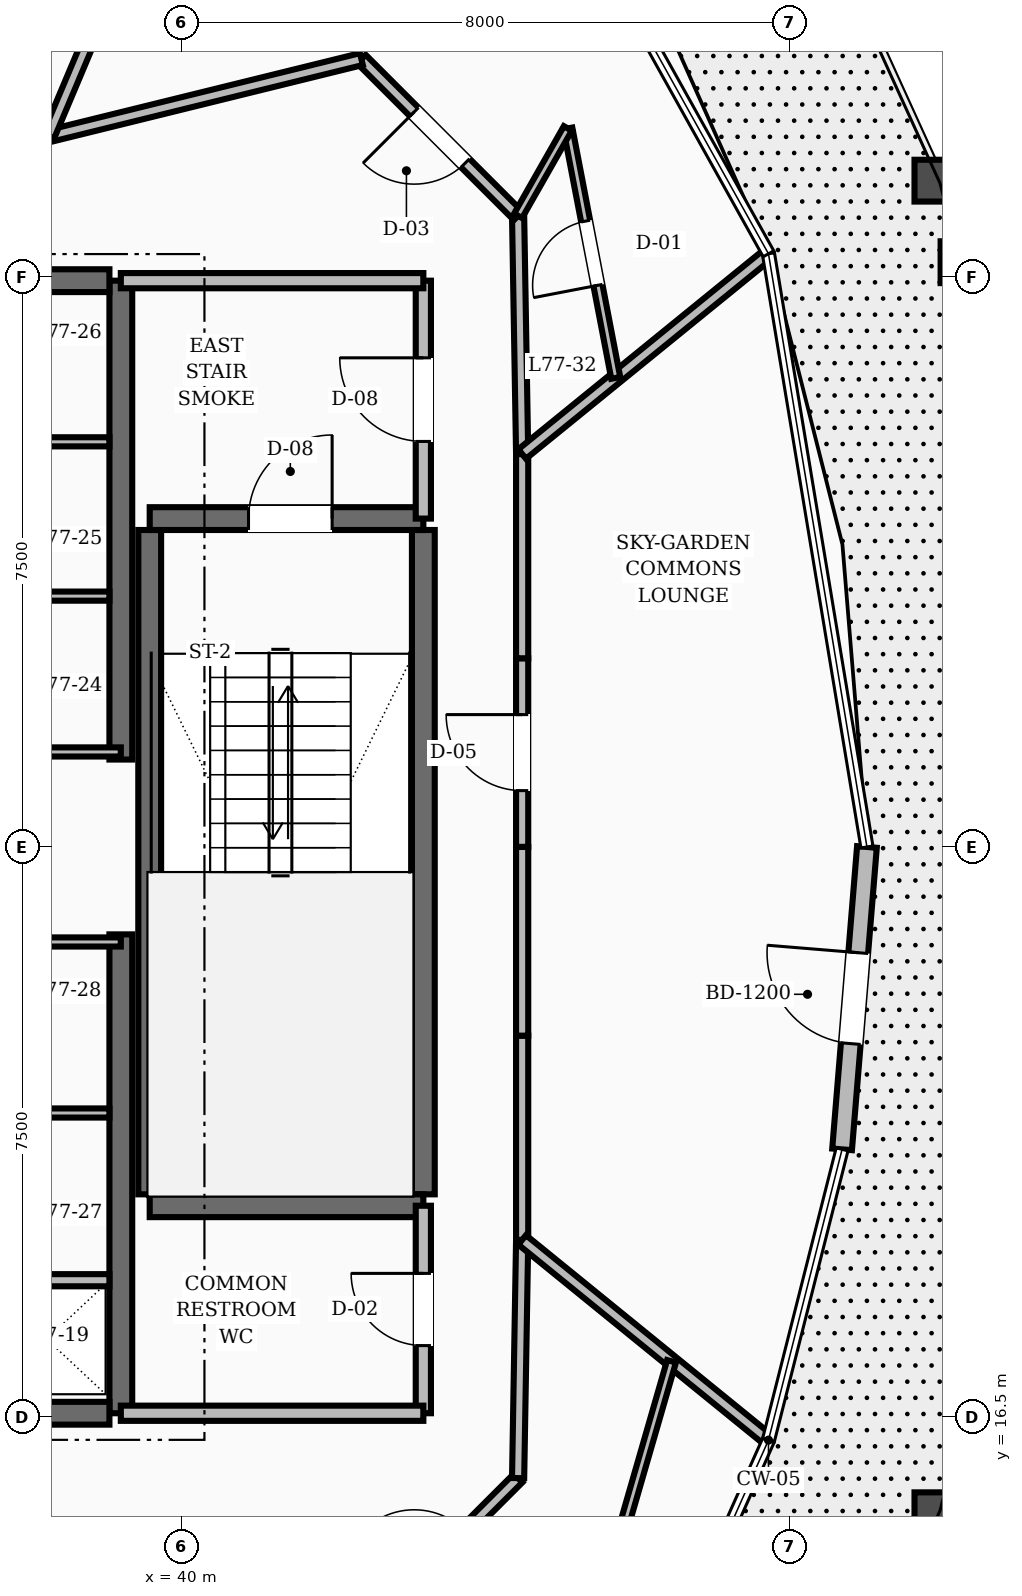
"""IFC4 building model, lengths in metres.
Left out: names, types, materials, properties, quantities, classifications, styles, units other than length and angle.
Written with IfcOpenShell. Run it as: python <this file> out.ifc"""

import sys

from ifc_helpers import new_model, si_unit, direction, frame, frame_2d, origin, place, context, subcontext, project, spatial, rectangle, extrude, element, fill, save


model = new_model("IFC4")
c1 = context("Model", 3, precision=1e-05, world=origin(), true_north=direction((0.0, 1.0)))
c2 = subcontext(c1, "Body", "Model", "MODEL_VIEW")
j1 = project(units=[si_unit("LENGTHUNIT", "METRE"), si_unit("PLANEANGLEUNIT", "RADIAN")], contexts=[c1])
p1 = place(None, origin())
s1 = spatial("IfcSite", under=j1, at=p1, CompositionType="ELEMENT")
p2 = place(p1, origin())
s2 = spatial("IfcBuilding", under=s1, at=p2, CompositionType="ELEMENT")
p3 = place(p2, frame((0.0, 0.0, 294.0)))
s3 = spatial("IfcBuildingStorey", under=s2, at=p3, CompositionType="ELEMENT", Elevation=294.0)
for number, where, z_axis, x_axis in (
    (1, (39.2, 16.55, 0.0), (0.0, 0.0, 1.0), (0.0, 1.0, 0.0)),
    (2, (39.2, 25.15, 0.0), (0.0, 0.0, 1.0), (0.0, 1.0, 0.0)),
):
    element("IfcWall", number, at=place(p3, frame(where, z_axis=z_axis, x_axis=x_axis)), inside=s3, PredefinedType="SHEAR", context=c2, shape_type="SweptSolid", body=[
        extrude(rectangle(XDim=6.3, YDim=0.3, at=frame_2d((3.15, 0.0))), origin(), (0.0, 0.0, 1.0), 3.6),
    ])
p4 = place(p3, frame((35.8, 16.55, 0.0), z_axis=(0.0, 0.0, 1.0), x_axis=(1.0, 0.0, 0.0)))
e3 = element("IfcWall", 3, at=p4, inside=s3, PredefinedType="SHEAR", context=c2, shape_type="SweptSolid", body=[
    extrude(rectangle(XDim=3.25, YDim=0.3, at=frame_2d((1.625, 0.0))), origin(), (0.0, 0.0, 1.0), 3.6),
])
p5 = place(p4, frame((0.3, 0.0, 0.0)))
e4 = element("IfcOpeningElement", 4, at=p5, cuts=e3, PredefinedType="OPENING", context=c2, shape_type="SweptSolid", body=[
    extrude(rectangle(XDim=1.1, YDim=2.1, at=frame_2d((0.55, 1.05))), frame((0.0, 0.16, 0.0), z_axis=(0.0, -1.0, 0.0), x_axis=(1.0, 0.0, 0.0)), (0.0, 0.0, 1.0), 0.32),
])
p6 = place(p3, frame((35.8, 31.45, 0.0), z_axis=(0.0, 0.0, 1.0), x_axis=(1.0, 0.0, 0.0)))
e5 = element("IfcWall", 5, at=p6, inside=s3, PredefinedType="SHEAR", context=c2, shape_type="SweptSolid", body=[
    extrude(rectangle(XDim=3.25, YDim=0.3, at=frame_2d((1.625, 0.0))), origin(), (0.0, 0.0, 1.0), 3.6),
])
p7 = place(p6, frame((0.3, 0.0, 0.0)))
e6 = element("IfcOpeningElement", 6, at=p7, cuts=e5, PredefinedType="OPENING", context=c2, shape_type="SweptSolid", body=[
    extrude(rectangle(XDim=1.1, YDim=2.1, at=frame_2d((0.55, 1.05))), frame((0.0, 0.16, 0.0), z_axis=(0.0, -1.0, 0.0), x_axis=(1.0, 0.0, 0.0)), (0.0, 0.0, 1.0), 0.32),
])
for number, where, z_axis, x_axis in (
    (7, (43.18, 19.43, 0.0), (0.0, 0.0, 1.0), (0.0, 1.0, 0.0)),
    (8, (39.58, 19.43, 0.0), (0.0, 0.0, 1.0), (0.0, 1.0, 0.0)),
):
    element("IfcWall", number, at=place(p3, frame(where, z_axis=z_axis, x_axis=x_axis)), inside=s3, PredefinedType="SHEAR", context=c2, shape_type="SweptSolid", body=[
        extrude(rectangle(XDim=8.74, YDim=0.3, at=frame_2d((4.37, 0.0))), origin(), (0.0, 0.0, 1.0), 3.6),
    ])
p8 = place(p3, frame((39.58, 19.28, 0.0), z_axis=(0.0, 0.0, 1.0), x_axis=(1.0, 0.0, 0.0)))
e9 = element("IfcWall", 9, at=p8, inside=s3, PredefinedType="SHEAR", context=c2, shape_type="SweptSolid", body=[
    extrude(rectangle(XDim=3.6, YDim=0.3, at=frame_2d((1.8, 0.0))), origin(), (0.0, 0.0, 1.0), 3.6),
])
p9 = place(p3, frame((39.58, 28.32, 0.0), z_axis=(0.0, 0.0, 1.0), x_axis=(1.0, 0.0, 0.0)))
e10 = element("IfcWall", 10, at=p9, inside=s3, PredefinedType="SHEAR", context=c2, shape_type="SweptSolid", body=[
    extrude(rectangle(XDim=3.6, YDim=0.3, at=frame_2d((1.8, 0.0))), origin(), (0.0, 0.0, 1.0), 3.6),
])
p10 = place(p9, frame((1.3, 0.0, 0.0)))
e11 = element("IfcOpeningElement", 11, at=p10, cuts=e10, PredefinedType="OPENING", context=c2, shape_type="SweptSolid", body=[
    extrude(rectangle(XDim=1.1, YDim=2.1, at=frame_2d((0.55, 1.05))), frame((0.0, 0.16, 0.0), z_axis=(0.0, -1.0, 0.0), x_axis=(1.0, 0.0, 0.0)), (0.0, 0.0, 1.0), 0.32),
])
p11 = place(p3, frame((48.689, 20.022, 0.0), z_axis=(0.0, 0.0, 1.0), x_axis=(0.081957167383, 0.996635852613, 0.0)))
e12 = element("IfcWall", 12, at=p11, inside=s3, PredefinedType="STANDARD", context=c2, shape_type="SweptSolid", body=[
    extrude(rectangle(XDim=3.992, YDim=0.26, at=frame_2d((1.996, 0.0))), origin(), (0.0, 0.0, 1.0), 2.82),
])
p12 = place(p11, frame((1.396, 0.0, 0.0)))
e13 = element("IfcOpeningElement", 13, at=p12, cuts=e12, PredefinedType="OPENING", context=c2, shape_type="SweptSolid", body=[
    extrude(rectangle(XDim=1.2, YDim=2.15, at=frame_2d((0.6, 1.075))), frame((0.0, 0.14, 0.0), z_axis=(0.0, -1.0, 0.0), x_axis=(1.0, 0.0, 0.0)), (0.0, 0.0, 1.0), 0.28),
])
p13 = place(p3, frame((43.18, 28.32, 0.0), z_axis=(0.0, 0.0, 1.0), x_axis=(0.0, 1.0, 0.0)))
e14 = element("IfcWall", 14, at=p13, inside=s3, PredefinedType="SOLIDWALL", context=c2, shape_type="SweptSolid", body=[
    extrude(rectangle(XDim=3.13, YDim=0.2, at=frame_2d((1.565, 0.0))), origin(), (0.0, 0.0, 1.0), 2.81),
])
p14 = place(p13, frame((1.015, 0.0, 0.0)))
e15 = element("IfcOpeningElement", 15, at=p14, cuts=e14, PredefinedType="OPENING", context=c2, shape_type="SweptSolid", body=[
    extrude(rectangle(XDim=1.1, YDim=2.1, at=frame_2d((0.55, 1.05))), frame((0.0, 0.11, 0.0), z_axis=(0.0, -1.0, 0.0), x_axis=(1.0, 0.0, 0.0)), (0.0, 0.0, 1.0), 0.22),
])
p15 = place(p3, frame((39.2, 31.45, 0.0), z_axis=(0.0, 0.0, 1.0), x_axis=(1.0, 0.0, 0.0)))
e16 = element("IfcWall", 16, at=p15, inside=s3, PredefinedType="SOLIDWALL", context=c2, shape_type="SweptSolid", body=[
    extrude(rectangle(XDim=3.98, YDim=0.2, at=frame_2d((1.99, 0.0))), origin(), (0.0, 0.0, 1.0), 2.81),
])
p16 = place(p3, frame((43.18, 16.55, 0.0), z_axis=(0.0, 0.0, 1.0), x_axis=(0.0, 1.0, 0.0)))
e17 = element("IfcWall", 17, at=p16, inside=s3, PredefinedType="SOLIDWALL", context=c2, shape_type="SweptSolid", body=[
    extrude(rectangle(XDim=2.73, YDim=0.2, at=frame_2d((1.365, 0.0))), origin(), (0.0, 0.0, 1.0), 2.81),
])
p17 = place(p16, frame((0.89, 0.0, 0.0)))
e18 = element("IfcOpeningElement", 18, at=p17, cuts=e17, PredefinedType="OPENING", context=c2, shape_type="SweptSolid", body=[
    extrude(rectangle(XDim=0.95, YDim=2.1, at=frame_2d((0.475, 1.05))), frame((0.0, 0.11, 0.0), z_axis=(0.0, -1.0, 0.0), x_axis=(1.0, 0.0, 0.0)), (0.0, 0.0, 1.0), 0.22),
])
p18 = place(p3, frame((39.2, 16.55, 0.0), z_axis=(0.0, 0.0, 1.0), x_axis=(1.0, 0.0, 0.0)))
e19 = element("IfcWall", 19, at=p18, inside=s3, PredefinedType="SOLIDWALL", context=c2, shape_type="SweptSolid", body=[
    extrude(rectangle(XDim=3.98, YDim=0.2, at=frame_2d((1.99, 0.0))), origin(), (0.0, 0.0, 1.0), 2.81),
])
p19 = place(p3, frame((37.4, 18.3, 0.0), z_axis=(0.0, 0.0, 1.0), x_axis=(1.0, 0.0, 0.0)))
e20 = element("IfcWall", 20, at=p19, inside=s3, PredefinedType="SOLIDWALL", context=c2, shape_type="SweptSolid", body=[
    extrude(rectangle(XDim=1.65, YDim=0.16, at=frame_2d((0.825, 0.0))), origin(), (0.0, 0.0, 1.0), 2.81),
])
for number, where, z_axis, x_axis in (
    (21, (37.4, 25.25, 0.0), (0.0, 0.0, 1.0), (1.0, 0.0, 0.0)),
    (22, (37.4, 22.75, 0.0), (0.0, 0.0, 1.0), (1.0, 0.0, 0.0)),
):
    element("IfcWall", number, at=place(p3, frame(where, z_axis=z_axis, x_axis=x_axis)), inside=s3, PredefinedType="PARTITIONING", context=c2, shape_type="SweptSolid", body=[
        extrude(rectangle(XDim=1.8, YDim=0.12, at=frame_2d((0.9, 0.0))), origin(), (0.0, 0.0, 1.0), 2.81),
    ])
for number, where, z_axis, x_axis in (
    (23, (37.4, 27.3, 0.0), (0.0, 0.0, 1.0), (1.0, 0.0, 0.0)),
    (24, (37.4, 29.33, 0.0), (0.0, 0.0, 1.0), (1.0, 0.0, 0.0)),
    (25, (37.4, 20.5, 0.0), (0.0, 0.0, 1.0), (1.0, 0.0, 0.0)),
):
    element("IfcWall", number, at=place(p3, frame(where, z_axis=z_axis, x_axis=x_axis)), inside=s3, PredefinedType="PARTITIONING", context=c2, shape_type="SweptSolid", body=[
        extrude(rectangle(XDim=1.65, YDim=0.12, at=frame_2d((0.825, 0.0))), origin(), (0.0, 0.0, 1.0), 2.81),
    ])
p20 = place(p3, frame((44.48, 24.0, 0.0), z_axis=(0.0, 0.0, 1.0), x_axis=(0.0, 1.0, 0.0)))
e26 = element("IfcWall", 26, at=p20, inside=s3, PredefinedType="SOLIDWALL", context=c2, shape_type="SweptSolid", body=[
    extrude(rectangle(XDim=2.482, YDim=0.16, at=frame_2d((1.241, 0.0))), origin(), (0.0, 0.0, 1.0), 2.81),
])
p21 = place(p20, frame((0.741, 0.0, 0.0)))
e27 = element("IfcOpeningElement", 27, at=p21, cuts=e26, PredefinedType="OPENING", context=c2, shape_type="SweptSolid", body=[
    extrude(rectangle(XDim=1.0, YDim=2.1, at=frame_2d((0.5, 1.05))), frame((0.0, 0.09, 0.0), z_axis=(0.0, -1.0, 0.0), x_axis=(1.0, 0.0, 0.0)), (0.0, 0.0, 1.0), 0.18),
])
p22 = place(p3, frame((44.48, 26.482, 0.0), z_axis=(0.0, 0.0, 1.0), x_axis=(0.0, 1.0, 0.0)))
e28 = element("IfcWall", 28, at=p22, inside=s3, PredefinedType="SOLIDWALL", context=c2, shape_type="SweptSolid", body=[
    extrude(rectangle(XDim=2.687, YDim=0.16, at=frame_2d((1.344, 0.0))), origin(), (0.0, 0.0, 1.0), 2.81),
])
p23 = place(p3, frame((44.48, 29.169, 0.0), z_axis=(0.0, 0.0, 1.0), x_axis=(-0.016981035134, 0.999855811828, 0.0)))
e29 = element("IfcWall", 29, at=p23, inside=s3, PredefinedType="SOLIDWALL", context=c2, shape_type="SweptSolid", body=[
    extrude(rectangle(XDim=3.134, YDim=0.16, at=frame_2d((1.567, 0.0))), origin(), (0.0, 0.0, 1.0), 2.81),
])
p24 = place(p3, frame((44.427, 32.303, 0.0), z_axis=(0.0, 0.0, 1.0), x_axis=(-0.707106781187, 0.707106781187, 0.0)))
e30 = element("IfcWall", 30, at=p24, inside=s3, PredefinedType="SOLIDWALL", context=c2, shape_type="SweptSolid", body=[
    extrude(rectangle(XDim=2.916, YDim=0.16, at=frame_2d((1.458, 0.0))), origin(), (0.0, 0.0, 1.0), 2.81),
])
p25 = place(p24, frame((0.983, 0.0, 0.0)))
e31 = element("IfcOpeningElement", 31, at=p25, cuts=e30, PredefinedType="OPENING", context=c2, shape_type="SweptSolid", body=[
    extrude(rectangle(XDim=0.95, YDim=2.1, at=frame_2d((0.475, 1.05))), frame((0.0, 0.09, 0.0), z_axis=(0.0, -1.0, 0.0), x_axis=(1.0, 0.0, 0.0)), (0.0, 0.0, 1.0), 0.18),
])
p26 = place(p3, frame((42.365, 34.365, 0.0), z_axis=(0.0, 0.0, 1.0), x_axis=(-0.970939799552, -0.239323850978, 0.0)))
e32 = element("IfcWall", 32, at=p26, inside=s3, PredefinedType="SOLIDWALL", context=c2, shape_type="SweptSolid", body=[
    extrude(rectangle(XDim=4.241, YDim=0.16, at=frame_2d((2.12, 0.0))), origin(), (0.0, 0.0, 1.0), 2.81),
])
p27 = place(p3, frame((42.365, 13.635, 0.0), z_axis=(0.0, 0.0, 1.0), x_axis=(0.707106781187, 0.707106781187, 0.0)))
e33 = element("IfcWall", 33, at=p27, inside=s3, PredefinedType="SOLIDWALL", context=c2, shape_type="SweptSolid", body=[
    extrude(rectangle(XDim=2.916, YDim=0.16, at=frame_2d((1.458, 0.0))), origin(), (0.0, 0.0, 1.0), 2.81),
])
p28 = place(p27, frame((0.983, 0.0, 0.0)))
e34 = element("IfcOpeningElement", 34, at=p28, cuts=e33, PredefinedType="OPENING", context=c2, shape_type="SweptSolid", body=[
    extrude(rectangle(XDim=0.95, YDim=2.1, at=frame_2d((0.475, 1.05))), frame((0.0, 0.09, 0.0), z_axis=(0.0, -1.0, 0.0), x_axis=(1.0, 0.0, 0.0)), (0.0, 0.0, 1.0), 0.18),
])
p29 = place(p3, frame((44.427, 15.697, 0.0), z_axis=(0.0, 0.0, 1.0), x_axis=(0.016981035134, 0.999855811828, 0.0)))
e35 = element("IfcWall", 35, at=p29, inside=s3, PredefinedType="SOLIDWALL", context=c2, shape_type="SweptSolid", body=[
    extrude(rectangle(XDim=3.134, YDim=0.16, at=frame_2d((1.567, 0.0))), origin(), (0.0, 0.0, 1.0), 2.81),
])
p30 = place(p3, frame((44.48, 18.831, 0.0), z_axis=(0.0, 0.0, 1.0), x_axis=(0.0, 1.0, 0.0)))
e36 = element("IfcWall", 36, at=p30, inside=s3, PredefinedType="SOLIDWALL", context=c2, shape_type="SweptSolid", body=[
    extrude(rectangle(XDim=2.687, YDim=0.16, at=frame_2d((1.344, 0.0))), origin(), (0.0, 0.0, 1.0), 2.81),
])
p31 = place(p3, frame((44.48, 21.518, 0.0), z_axis=(0.0, 0.0, 1.0), x_axis=(0.0, 1.0, 0.0)))
e37 = element("IfcWall", 37, at=p31, inside=s3, PredefinedType="SOLIDWALL", context=c2, shape_type="SweptSolid", body=[
    extrude(rectangle(XDim=2.482, YDim=0.16, at=frame_2d((1.241, 0.0))), origin(), (0.0, 0.0, 1.0), 2.81),
])
for number, where, z_axis, x_axis in (
    (38, (44.48, 18.831, 0.0), (0.0, 0.0, 1.0), (0.776, -0.631, 0.0)),
    (39, (44.48, 29.169, 0.0), (0.0, 0.0, 1.0), (0.776, 0.631, 0.0)),
):
    element("IfcWall", number, at=place(p3, frame(where, z_axis=z_axis, x_axis=x_axis)), inside=s3, PredefinedType="SOLIDWALL", context=c2, shape_type="SweptSolid", body=[
        extrude(rectangle(XDim=4.126, YDim=0.16, at=frame_2d((2.063, 0.0))), origin(), (0.0, 0.0, 1.0), 2.81),
    ])
p32 = place(p3, frame((45.711, 30.17, 0.0), z_axis=(0.0, 0.0, 1.0), x_axis=(-0.18865234905, 0.982043935472, 0.0)))
e40 = element("IfcWall", 40, at=p32, inside=s3, PredefinedType="PARTITIONING", context=c2, shape_type="SweptSolid", body=[
    extrude(rectangle(XDim=3.343, YDim=0.12, at=frame_2d((1.671, 0.0))), origin(), (0.0, 0.0, 1.0), 2.81),
])
p33 = place(p32, frame((1.241, 0.0, 0.0)))
e41 = element("IfcOpeningElement", 41, at=p33, cuts=e40, PredefinedType="OPENING", context=c2, shape_type="SweptSolid", body=[
    extrude(rectangle(XDim=0.86, YDim=2.1, at=frame_2d((0.43, 1.05))), frame((0.0, 0.07, 0.0), z_axis=(0.0, -1.0, 0.0), x_axis=(1.0, 0.0, 0.0)), (0.0, 0.0, 1.0), 0.14),
])
p34 = place(p3, frame((44.427, 32.303, 0.0), z_axis=(0.0, 0.0, 1.0), x_axis=(0.494408865021, 0.869229471537, 0.0)))
e42 = element("IfcWall", 42, at=p34, inside=s3, PredefinedType="PARTITIONING", context=c2, shape_type="SweptSolid", body=[
    extrude(rectangle(XDim=1.323, YDim=0.12, at=frame_2d((0.662, 0.0))), origin(), (0.0, 0.0, 1.0), 2.81),
])
p35 = place(p3, frame((38.248, 33.35, 0.0), z_axis=(0.0, 0.0, 1.0), x_axis=(0.388445474078, 0.921471710726, 0.0)))
e43 = element("IfcWall", 43, at=p35, inside=s3, PredefinedType="SOLIDWALL", context=c2, shape_type="SweptSolid", body=[
    extrude(rectangle(XDim=8.203, YDim=0.16, at=frame_2d((4.102, 0.0))), origin(), (0.0, 0.0, 1.0), 2.81),
])
p36 = place(p3, frame((45.471, 13.862, 0.0), z_axis=(0.0, 0.0, 1.0), x_axis=(0.277715153413, 0.960663465301, 0.0)))
e44 = element("IfcWall", 44, at=p36, inside=s3, PredefinedType="PARTITIONING", context=c2, shape_type="SweptSolid", body=[
    extrude(rectangle(XDim=3.509, YDim=0.12, at=frame_2d((1.755, 0.0))), origin(), (0.0, 0.0, 1.0), 2.81),
])
p37 = place(p12, origin())
e45 = element("IfcDoor", 45, at=p37, inside=s3, OperationType="SINGLE_SWING_RIGHT", PredefinedType="DOOR", context=c2, shape_type="SweptSolid", body=[
    extrude(rectangle(XDim=1.2, YDim=2.15, at=frame_2d((0.6, 1.075))), frame((0.0, 0.025, 0.0), z_axis=(0.0, -1.0, 0.0), x_axis=(1.0, 0.0, 0.0)), (0.0, 0.0, 1.0), 0.05),
])
fill(e13, e45)
p38 = place(p10, origin())
e46 = element("IfcDoor", 46, at=p38, inside=s3, OperationType="SINGLE_SWING_RIGHT", PredefinedType="DOOR", context=c2, shape_type="SweptSolid", body=[
    extrude(rectangle(XDim=1.1, YDim=2.1, at=frame_2d((0.55, 1.05))), frame((0.0, 0.025, 0.0), z_axis=(0.0, -1.0, 0.0), x_axis=(1.0, 0.0, 0.0)), (0.0, 0.0, 1.0), 0.05),
])
fill(e11, e46)
p39 = place(p14, origin())
e47 = element("IfcDoor", 47, at=p39, inside=s3, OperationType="SINGLE_SWING_RIGHT", PredefinedType="DOOR", context=c2, shape_type="SweptSolid", body=[
    extrude(rectangle(XDim=1.1, YDim=2.1, at=frame_2d((0.55, 1.05))), frame((0.0, 0.025, 0.0), z_axis=(0.0, -1.0, 0.0), x_axis=(1.0, 0.0, 0.0)), (0.0, 0.0, 1.0), 0.05),
])
fill(e15, e47)
p40 = place(p17, origin())
e48 = element("IfcDoor", 48, at=p40, inside=s3, OperationType="SINGLE_SWING_RIGHT", PredefinedType="DOOR", context=c2, shape_type="SweptSolid", body=[
    extrude(rectangle(XDim=0.95, YDim=2.1, at=frame_2d((0.475, 1.05))), frame((0.0, 0.025, 0.0), z_axis=(0.0, -1.0, 0.0), x_axis=(1.0, 0.0, 0.0)), (0.0, 0.0, 1.0), 0.05),
])
fill(e18, e48)
p41 = place(p21, origin())
e49 = element("IfcDoor", 49, at=p41, inside=s3, OperationType="SINGLE_SWING_RIGHT", PredefinedType="DOOR", context=c2, shape_type="SweptSolid", body=[
    extrude(rectangle(XDim=1.0, YDim=2.1, at=frame_2d((0.5, 1.05))), frame((0.0, 0.025, 0.0), z_axis=(0.0, -1.0, 0.0), x_axis=(1.0, 0.0, 0.0)), (0.0, 0.0, 1.0), 0.05),
])
fill(e27, e49)
p42 = place(p33, origin())
e50 = element("IfcDoor", 50, at=p42, inside=s3, OperationType="SINGLE_SWING_LEFT", PredefinedType="DOOR", context=c2, shape_type="SweptSolid", body=[
    extrude(rectangle(XDim=0.86, YDim=2.1, at=frame_2d((0.43, 1.05))), frame((0.0, 0.025, 0.0), z_axis=(0.0, -1.0, 0.0), x_axis=(1.0, 0.0, 0.0)), (0.0, 0.0, 1.0), 0.05),
])
fill(e41, e50)
p43 = place(p25, origin())
e51 = element("IfcDoor", 51, at=p43, inside=s3, OperationType="SINGLE_SWING_RIGHT", PredefinedType="DOOR", context=c2, shape_type="SweptSolid", body=[
    extrude(rectangle(XDim=0.95, YDim=2.1, at=frame_2d((0.475, 1.05))), frame((0.0, 0.025, 0.0), z_axis=(0.0, -1.0, 0.0), x_axis=(1.0, 0.0, 0.0)), (0.0, 0.0, 1.0), 0.05),
])
fill(e31, e51)
save(model, sys.argv[1])
